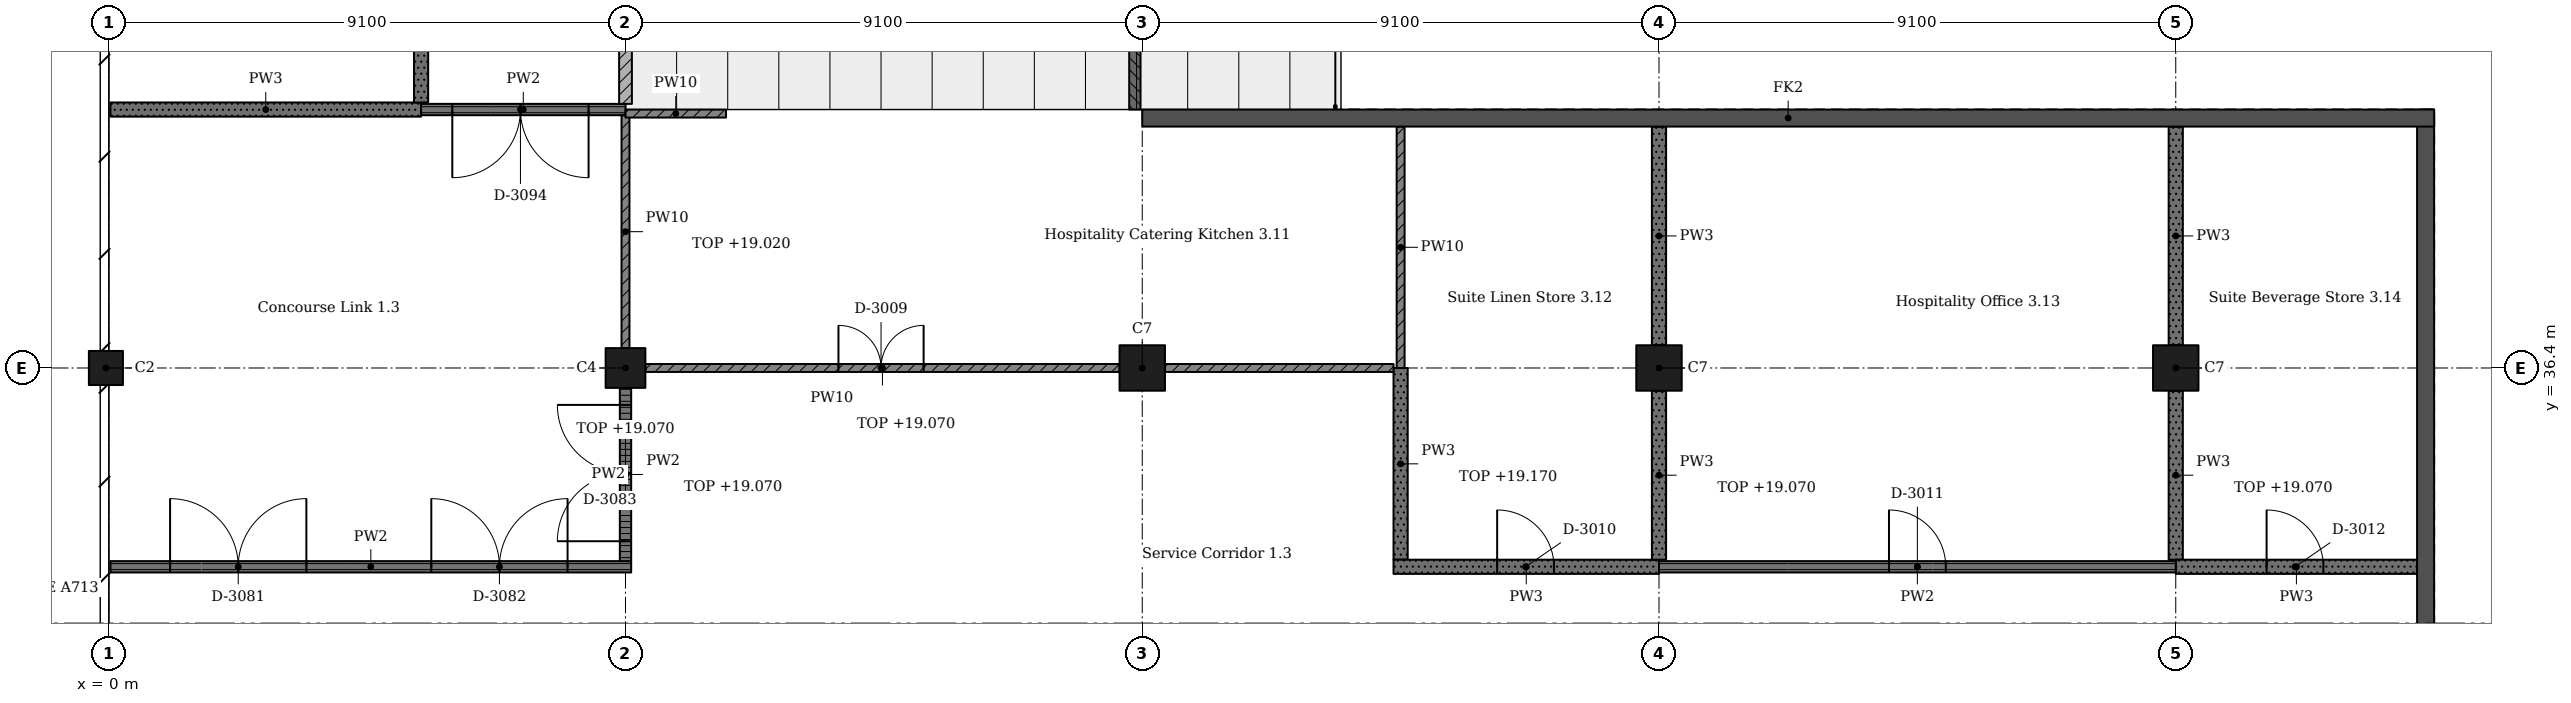
"""IFC4 building model, lengths in metres.
Left out: names, types, materials, properties, quantities, classifications, styles, units other than length and angle.
Written with IfcOpenShell. Run it as: python <this file> out.ifc"""

import sys

from ifc_helpers import new_model, si_unit, direction, frame, frame_2d, origin, origin_2d, place, context, subcontext, project, spatial, rectangle, extrude, element, fill, save


model = new_model("IFC4")
c1 = context("Model", 3, precision=1e-05, world=origin(), true_north=direction((0.0, 1.0)))
c2 = subcontext(c1, "Body", "Model", "MODEL_VIEW")
j1 = project(units=[si_unit("LENGTHUNIT", "METRE"), si_unit("PLANEANGLEUNIT", "RADIAN")], contexts=[c1])
p1 = place(None, origin())
s1 = spatial("IfcSite", under=j1, at=p1, CompositionType="ELEMENT")
p2 = place(p1, origin())
s2 = spatial("IfcBuilding", under=s1, at=p2, CompositionType="ELEMENT")
p3 = place(p2, frame((0.0, 0.0, 15.47)))
s3 = spatial("IfcBuildingStorey", under=s2, at=p3, CompositionType="ELEMENT", Elevation=15.47)
p4 = place(p3, frame((-0.05, 36.4, 0.0), z_axis=(0.0, 0.0, 1.0), x_axis=(1.0, 0.0, 0.0)))
e1 = element("IfcColumn", 1, at=p4, inside=s3, PredefinedType="COLUMN", context=c2, shape_type="SweptSolid", body=[
    extrude(rectangle(XDim=0.6, YDim=0.6, at=origin_2d()), origin(), (0.0, 0.0, 1.0), 4.55),
])
p5 = place(p3, frame((9.1, 36.4, 0.0), z_axis=(0.0, 0.0, 1.0), x_axis=(1.0, 0.0, 0.0)))
e2 = element("IfcColumn", 2, at=p5, inside=s3, PredefinedType="COLUMN", context=c2, shape_type="SweptSolid", body=[
    extrude(rectangle(XDim=0.7, YDim=0.7, at=origin_2d()), origin(), (0.0, 0.0, 1.0), 4.55),
])
for number, where, z_axis, x_axis in (
    (3, (18.2, 36.4, 0.0), (0.0, 0.0, 1.0), (1.0, 0.0, 0.0)),
    (4, (27.3, 36.4, 0.0), (0.0, 0.0, 1.0), (1.0, 0.0, 0.0)),
    (5, (36.4, 36.4, 0.0), (0.0, 0.0, 1.0), (1.0, 0.0, 0.0)),
):
    element("IfcColumn", number, at=place(p3, frame(where, z_axis=z_axis, x_axis=x_axis)), inside=s3, PredefinedType="COLUMN", context=c2, shape_type="SweptSolid", body=[
        extrude(rectangle(XDim=0.8, YDim=0.8, at=origin_2d()), origin(), (0.0, 0.0, 1.0), 4.55),
    ])
for number, where, z_axis, x_axis in (
    (6, (40.8, 40.95, 0.0), (0.0, 0.0, 1.0), (0.0, -1.0, 0.0)),
    (7, (40.95, 40.8, 0.0), (0.0, 0.0, 1.0), (-1.0, 0.0, 0.0)),
):
    element("IfcWall", number, at=place(p3, frame(where, z_axis=z_axis, x_axis=x_axis)), inside=s3, PredefinedType="SHEAR", context=c2, shape_type="SweptSolid", body=[
        extrude(rectangle(XDim=22.75, YDim=0.3, at=frame_2d((11.375, 0.0))), origin(), (0.0, 0.0, 1.0), 4.55),
    ])
p6 = place(p3, frame((0.03, 32.9, 0.0), z_axis=(0.0, 0.0, 1.0), x_axis=(1.0, 0.0, 0.0)))
e8 = element("IfcWall", 8, at=p6, inside=s3, PredefinedType="PARTITIONING", context=c2, shape_type="SweptSolid", body=[
    extrude(rectangle(XDim=9.17, YDim=0.2, at=frame_2d((4.585, 0.0))), origin(), (0.0, 0.0, 1.0), 4.3),
])
p7 = place(p6, frame((1.05, 0.0, 0.0)))
e9 = element("IfcOpeningElement", 9, at=p7, cuts=e8, PredefinedType="OPENING", context=c2, shape_type="SweptSolid", body=[
    extrude(rectangle(XDim=2.4, YDim=2.4, at=frame_2d((1.2, 1.2))), frame((0.0, 0.11, 0.0), z_axis=(0.0, -1.0, 0.0), x_axis=(1.0, 0.0, 0.0)), (0.0, 0.0, 1.0), 0.22),
])
p8 = place(p6, frame((5.65, 0.0, 0.0)))
e10 = element("IfcOpeningElement", 10, at=p8, cuts=e8, PredefinedType="OPENING", context=c2, shape_type="SweptSolid", body=[
    extrude(rectangle(XDim=2.4, YDim=2.4, at=frame_2d((1.2, 1.2))), frame((0.0, 0.11, 0.0), z_axis=(0.0, -1.0, 0.0), x_axis=(1.0, 0.0, 0.0)), (0.0, 0.0, 1.0), 0.22),
])
p9 = place(p3, frame((0.03, 40.95, 0.0), z_axis=(0.0, 0.0, 1.0), x_axis=(1.0, 0.0, 0.0)))
e11 = element("IfcWall", 11, at=p9, inside=s3, PredefinedType="SOLIDWALL", context=c2, shape_type="SweptSolid", body=[
    extrude(rectangle(XDim=5.47, YDim=0.25, at=frame_2d((2.735, 0.0))), origin(), (0.0, 0.0, 1.0), 4.3),
])
p10 = place(p3, frame((5.5, 40.95, 0.0), z_axis=(0.0, 0.0, 1.0), x_axis=(1.0, 0.0, 0.0)))
e12 = element("IfcWall", 12, at=p10, inside=s3, PredefinedType="PARTITIONING", context=c2, shape_type="SweptSolid", body=[
    extrude(rectangle(XDim=3.6, YDim=0.2, at=frame_2d((1.8, 0.0))), origin(), (0.0, 0.0, 1.0), 4.3),
])
p11 = place(p10, frame((0.55, 0.0, 0.0)))
e13 = element("IfcOpeningElement", 13, at=p11, cuts=e12, PredefinedType="OPENING", context=c2, shape_type="SweptSolid", body=[
    extrude(rectangle(XDim=2.4, YDim=2.4, at=frame_2d((1.2, 1.2))), frame((0.0, 0.11, 0.0), z_axis=(0.0, -1.0, 0.0), x_axis=(1.0, 0.0, 0.0)), (0.0, 0.0, 1.0), 0.22),
])
p12 = place(p3, frame((5.5, 41.075, 0.0), z_axis=(0.0, 0.0, 1.0), x_axis=(0.0, 1.0, 0.0)))
e14 = element("IfcWall", 14, at=p12, inside=s3, PredefinedType="SOLIDWALL", context=c2, shape_type="SweptSolid", body=[
    extrude(rectangle(XDim=4.425, YDim=0.25, at=frame_2d((2.212, 0.0))), origin(), (0.0, 0.0, 1.0), 4.3),
])
p13 = place(p12, frame((1.75, 0.0, 0.0)))
e15 = element("IfcOpeningElement", 15, at=p13, cuts=e14, PredefinedType="OPENING", context=c2, shape_type="SweptSolid", body=[
    extrude(rectangle(XDim=1.0, YDim=2.1, at=frame_2d((0.5, 1.05))), frame((0.0, 0.135, 0.0), z_axis=(0.0, -1.0, 0.0), x_axis=(1.0, 0.0, 0.0)), (0.0, 0.0, 1.0), 0.27),
])
p14 = place(p3, frame((9.1, 33.0, 0.0), z_axis=(0.0, 0.0, 1.0), x_axis=(0.0, 1.0, 0.0)))
e16 = element("IfcWall", 16, at=p14, inside=s3, PredefinedType="PARTITIONING", context=c2, shape_type="SweptSolid", body=[
    extrude(rectangle(XDim=3.05, YDim=0.2, at=frame_2d((1.525, 0.0))), origin(), (0.0, 0.0, 1.0), 3.6),
])
p15 = place(p14, frame((0.35, 0.0, 0.0)))
e17 = element("IfcOpeningElement", 17, at=p15, cuts=e16, PredefinedType="OPENING", context=c2, shape_type="SweptSolid", body=[
    extrude(rectangle(XDim=2.4, YDim=2.4, at=frame_2d((1.2, 1.2))), frame((0.0, 0.11, 0.0), z_axis=(0.0, -1.0, 0.0), x_axis=(1.0, 0.0, 0.0)), (0.0, 0.0, 1.0), 0.22),
])
p16 = place(p3, frame((9.1, 36.75, 0.0), z_axis=(0.0, 0.0, 1.0), x_axis=(0.0, 1.0, 0.0)))
e18 = element("IfcWall", 18, at=p16, inside=s3, PredefinedType="SOLIDWALL", context=c2, shape_type="SweptSolid", body=[
    extrude(rectangle(XDim=4.1, YDim=0.14, at=frame_2d((2.05, 0.0))), origin(), (0.0, 0.0, 1.0), 3.55),
])
p17 = place(p3, frame((9.1, 40.879, 0.0), z_axis=(0.0, 0.0, 1.0), x_axis=(1.0, 0.0, 0.0)))
e19 = element("IfcWall", 19, at=p17, inside=s3, PredefinedType="SOLIDWALL", context=c2, shape_type="SweptSolid", body=[
    extrude(rectangle(XDim=1.77, YDim=0.14, at=frame_2d((0.885, 0.0))), origin(), (0.0, 0.0, 1.0), 4.3),
])
p18 = place(p3, frame((9.1, 45.2, 0.0), z_axis=(0.0, 0.0, 1.0), x_axis=(0.0, -1.0, 0.0)))
e20 = element("IfcWall", 20, at=p18, inside=s3, PredefinedType="PARTITIONING", context=c2, shape_type="SweptSolid", body=[
    extrude(rectangle(XDim=4.15, YDim=0.225, at=frame_2d((2.075, 0.0))), origin(), (0.0, 0.0, 1.0), 3.55),
])
p19 = place(p3, frame((17.8, 36.4, 0.0), z_axis=(0.0, 0.0, 1.0), x_axis=(-1.0, 0.0, 0.0)))
e21 = element("IfcWall", 21, at=p19, inside=s3, PredefinedType="SOLIDWALL", context=c2, shape_type="SweptSolid", body=[
    extrude(rectangle(XDim=8.35, YDim=0.14, at=frame_2d((4.175, 0.0))), origin(), (0.0, 0.0, 1.0), 3.6),
])
p20 = place(p19, frame((3.45, 0.0, 0.0)))
e22 = element("IfcOpeningElement", 22, at=p20, cuts=e21, PredefinedType="OPENING", context=c2, shape_type="SweptSolid", body=[
    extrude(rectangle(XDim=1.5, YDim=2.1, at=frame_2d((0.75, 1.05))), frame((0.0, 0.08, 0.0), z_axis=(0.0, -1.0, 0.0), x_axis=(1.0, 0.0, 0.0)), (0.0, 0.0, 1.0), 0.16),
])
p21 = place(p3, frame((22.625, 36.4, 0.0), z_axis=(0.0, 0.0, 1.0), x_axis=(-1.0, 0.0, 0.0)))
e23 = element("IfcWall", 23, at=p21, inside=s3, PredefinedType="SOLIDWALL", context=c2, shape_type="SweptSolid", body=[
    extrude(rectangle(XDim=4.025, YDim=0.14, at=frame_2d((2.012, 0.0))), origin(), (0.0, 0.0, 1.0), 3.6),
])
p22 = place(p3, frame((22.75, 33.025, 0.0), z_axis=(0.0, 0.0, 1.0), x_axis=(0.0, 1.0, 0.0)))
e24 = element("IfcWall", 24, at=p22, inside=s3, PredefinedType="SOLIDWALL", context=c2, shape_type="SweptSolid", body=[
    extrude(rectangle(XDim=3.375, YDim=0.25, at=frame_2d((1.688, 0.0))), origin(), (0.0, 0.0, 1.0), 3.7),
])
p23 = place(p3, frame((22.75, 40.65, 0.0), z_axis=(0.0, 0.0, 1.0), x_axis=(0.0, -1.0, 0.0)))
e25 = element("IfcWall", 25, at=p23, inside=s3, PredefinedType="SOLIDWALL", context=c2, shape_type="SweptSolid", body=[
    extrude(rectangle(XDim=4.25, YDim=0.14, at=frame_2d((2.125, 0.0))), origin(), (0.0, 0.0, 1.0), 4.3),
])
p24 = place(p3, frame((27.3, 32.9, 0.0), z_axis=(0.0, 0.0, 1.0), x_axis=(-1.0, 0.0, 0.0)))
e26 = element("IfcWall", 26, at=p24, inside=s3, PredefinedType="SOLIDWALL", context=c2, shape_type="SweptSolid", body=[
    extrude(rectangle(XDim=4.675, YDim=0.25, at=frame_2d((2.337, 0.0))), origin(), (0.0, 0.0, 1.0), 4.3),
])
p25 = place(p24, frame((1.85, 0.0, 0.0)))
e27 = element("IfcOpeningElement", 27, at=p25, cuts=e26, PredefinedType="OPENING", context=c2, shape_type="SweptSolid", body=[
    extrude(rectangle(XDim=1.0, YDim=2.1, at=frame_2d((0.5, 1.05))), frame((0.0, 0.135, 0.0), z_axis=(0.0, -1.0, 0.0), x_axis=(1.0, 0.0, 0.0)), (0.0, 0.0, 1.0), 0.27),
])
p26 = place(p3, frame((27.3, 36.0, 0.0), z_axis=(0.0, 0.0, 1.0), x_axis=(0.0, -1.0, 0.0)))
e28 = element("IfcWall", 28, at=p26, inside=s3, PredefinedType="SOLIDWALL", context=c2, shape_type="SweptSolid", body=[
    extrude(rectangle(XDim=2.975, YDim=0.25, at=frame_2d((1.488, 0.0))), origin(), (0.0, 0.0, 1.0), 3.6),
])
p27 = place(p3, frame((27.3, 40.65, 0.0), z_axis=(0.0, 0.0, 1.0), x_axis=(0.0, -1.0, 0.0)))
e29 = element("IfcWall", 29, at=p27, inside=s3, PredefinedType="SOLIDWALL", context=c2, shape_type="SweptSolid", body=[
    extrude(rectangle(XDim=3.85, YDim=0.25, at=frame_2d((1.925, 0.0))), origin(), (0.0, 0.0, 1.0), 4.3),
])
p28 = place(p3, frame((36.4, 32.9, 0.0), z_axis=(0.0, 0.0, 1.0), x_axis=(-1.0, 0.0, 0.0)))
e30 = element("IfcWall", 30, at=p28, inside=s3, PredefinedType="PARTITIONING", context=c2, shape_type="SweptSolid", body=[
    extrude(rectangle(XDim=9.1, YDim=0.2, at=frame_2d((4.55, 0.0))), origin(), (0.0, 0.0, 1.0), 4.3),
])
p29 = place(p28, frame((4.05, 0.0, 0.0)))
e31 = element("IfcOpeningElement", 31, at=p29, cuts=e30, PredefinedType="OPENING", context=c2, shape_type="SweptSolid", body=[
    extrude(rectangle(XDim=1.0, YDim=2.1, at=frame_2d((0.5, 1.05))), frame((0.0, 0.11, 0.0), z_axis=(0.0, -1.0, 0.0), x_axis=(1.0, 0.0, 0.0)), (0.0, 0.0, 1.0), 0.22),
])
p30 = place(p3, frame((36.4, 36.0, 0.0), z_axis=(0.0, 0.0, 1.0), x_axis=(0.0, -1.0, 0.0)))
e32 = element("IfcWall", 32, at=p30, inside=s3, PredefinedType="SOLIDWALL", context=c2, shape_type="SweptSolid", body=[
    extrude(rectangle(XDim=2.975, YDim=0.25, at=frame_2d((1.488, 0.0))), origin(), (0.0, 0.0, 1.0), 3.6),
])
p31 = place(p3, frame((36.4, 40.65, 0.0), z_axis=(0.0, 0.0, 1.0), x_axis=(0.0, -1.0, 0.0)))
e33 = element("IfcWall", 33, at=p31, inside=s3, PredefinedType="SOLIDWALL", context=c2, shape_type="SweptSolid", body=[
    extrude(rectangle(XDim=3.85, YDim=0.25, at=frame_2d((1.925, 0.0))), origin(), (0.0, 0.0, 1.0), 4.3),
])
p32 = place(p3, frame((40.65, 32.9, 0.0), z_axis=(0.0, 0.0, 1.0), x_axis=(-1.0, 0.0, 0.0)))
e34 = element("IfcWall", 34, at=p32, inside=s3, PredefinedType="SOLIDWALL", context=c2, shape_type="SweptSolid", body=[
    extrude(rectangle(XDim=4.25, YDim=0.25, at=frame_2d((2.125, 0.0))), origin(), (0.0, 0.0, 1.0), 4.3),
])
p33 = place(p32, frame((1.65, 0.0, 0.0)))
e35 = element("IfcOpeningElement", 35, at=p33, cuts=e34, PredefinedType="OPENING", context=c2, shape_type="SweptSolid", body=[
    extrude(rectangle(XDim=1.0, YDim=2.1, at=frame_2d((0.5, 1.05))), frame((0.0, 0.135, 0.0), z_axis=(0.0, -1.0, 0.0), x_axis=(1.0, 0.0, 0.0)), (0.0, 0.0, 1.0), 0.27),
])
p34 = place(p3, frame((18.07, 45.2, 0.0), z_axis=(0.0, 0.0, 1.0), x_axis=(0.0, -1.0, 0.0)))
e36 = element("IfcWall", 36, at=p34, inside=s3, PredefinedType="PARTITIONING", context=c2, shape_type="SweptSolid", body=[
    extrude(rectangle(XDim=4.25, YDim=0.2, at=frame_2d((2.125, 0.0))), origin(), (0.0, 0.0, 1.0), 2.91),
])
p35 = place(p34, frame((1.125, 0.0, 1.1)))
e37 = element("IfcOpeningElement", 37, at=p35, cuts=e36, PredefinedType="OPENING", context=c2, shape_type="SweptSolid", body=[
    extrude(rectangle(XDim=2.0, YDim=1.3, at=frame_2d((1.0, 0.65))), frame((0.0, 0.11, 0.0), z_axis=(0.0, -1.0, 0.0), x_axis=(1.0, 0.0, 0.0)), (0.0, 0.0, 1.0), 0.22),
])
p36 = place(p20, origin())
e38 = element("IfcDoor", 38, at=p36, inside=s3, OperationType="DOUBLE_DOOR_SINGLE_SWING", PredefinedType="DOOR", context=c2, shape_type="SweptSolid", body=[
    extrude(rectangle(XDim=1.5, YDim=2.1, at=frame_2d((0.75, 1.05))), frame((0.0, 0.025, 0.0), z_axis=(0.0, -1.0, 0.0), x_axis=(1.0, 0.0, 0.0)), (0.0, 0.0, 1.0), 0.05),
])
fill(e22, e38)
p37 = place(p25, origin())
e39 = element("IfcDoor", 39, at=p37, inside=s3, OperationType="SINGLE_SWING_RIGHT", PredefinedType="DOOR", context=c2, shape_type="SweptSolid", body=[
    extrude(rectangle(XDim=1.0, YDim=2.1, at=frame_2d((0.5, 1.05))), frame((0.0, 0.025, 0.0), z_axis=(0.0, -1.0, 0.0), x_axis=(1.0, 0.0, 0.0)), (0.0, 0.0, 1.0), 0.05),
])
fill(e27, e39)
p38 = place(p29, origin())
e40 = element("IfcDoor", 40, at=p38, inside=s3, OperationType="SINGLE_SWING_RIGHT", PredefinedType="DOOR", context=c2, shape_type="SweptSolid", body=[
    extrude(rectangle(XDim=1.0, YDim=2.1, at=frame_2d((0.5, 1.05))), frame((0.0, 0.025, 0.0), z_axis=(0.0, -1.0, 0.0), x_axis=(1.0, 0.0, 0.0)), (0.0, 0.0, 1.0), 0.05),
])
fill(e31, e40)
p39 = place(p33, origin())
e41 = element("IfcDoor", 41, at=p39, inside=s3, OperationType="SINGLE_SWING_RIGHT", PredefinedType="DOOR", context=c2, shape_type="SweptSolid", body=[
    extrude(rectangle(XDim=1.0, YDim=2.1, at=frame_2d((0.5, 1.05))), frame((0.0, 0.025, 0.0), z_axis=(0.0, -1.0, 0.0), x_axis=(1.0, 0.0, 0.0)), (0.0, 0.0, 1.0), 0.05),
])
fill(e35, e41)
p40 = place(p7, origin())
e42 = element("IfcDoor", 42, at=p40, inside=s3, OperationType="DOUBLE_DOOR_SINGLE_SWING", PredefinedType="DOOR", context=c2, shape_type="SweptSolid", body=[
    extrude(rectangle(XDim=2.4, YDim=2.4, at=frame_2d((1.2, 1.2))), frame((0.0, 0.025, 0.0), z_axis=(0.0, -1.0, 0.0), x_axis=(1.0, 0.0, 0.0)), (0.0, 0.0, 1.0), 0.05),
])
fill(e9, e42)
p41 = place(p8, origin())
e43 = element("IfcDoor", 43, at=p41, inside=s3, OperationType="DOUBLE_DOOR_SINGLE_SWING", PredefinedType="DOOR", context=c2, shape_type="SweptSolid", body=[
    extrude(rectangle(XDim=2.4, YDim=2.4, at=frame_2d((1.2, 1.2))), frame((0.0, 0.025, 0.0), z_axis=(0.0, -1.0, 0.0), x_axis=(1.0, 0.0, 0.0)), (0.0, 0.0, 1.0), 0.05),
])
fill(e10, e43)
p42 = place(p15, origin())
e44 = element("IfcDoor", 44, at=p42, inside=s3, OperationType="DOUBLE_DOOR_SINGLE_SWING", PredefinedType="DOOR", context=c2, shape_type="SweptSolid", body=[
    extrude(rectangle(XDim=2.4, YDim=2.4, at=frame_2d((1.2, 1.2))), frame((0.0, 0.025, 0.0), z_axis=(0.0, -1.0, 0.0), x_axis=(1.0, 0.0, 0.0)), (0.0, 0.0, 1.0), 0.05),
])
fill(e17, e44)
p43 = place(p11, origin())
e45 = element("IfcDoor", 45, at=p43, inside=s3, OperationType="DOUBLE_DOOR_SINGLE_SWING", PredefinedType="DOOR", context=c2, shape_type="SweptSolid", body=[
    extrude(rectangle(XDim=2.4, YDim=2.4, at=frame_2d((1.2, 1.2))), frame((0.0, 0.025, 0.0), z_axis=(0.0, -1.0, 0.0), x_axis=(1.0, 0.0, 0.0)), (0.0, 0.0, 1.0), 0.05),
])
fill(e13, e45)
save(model, sys.argv[1])
